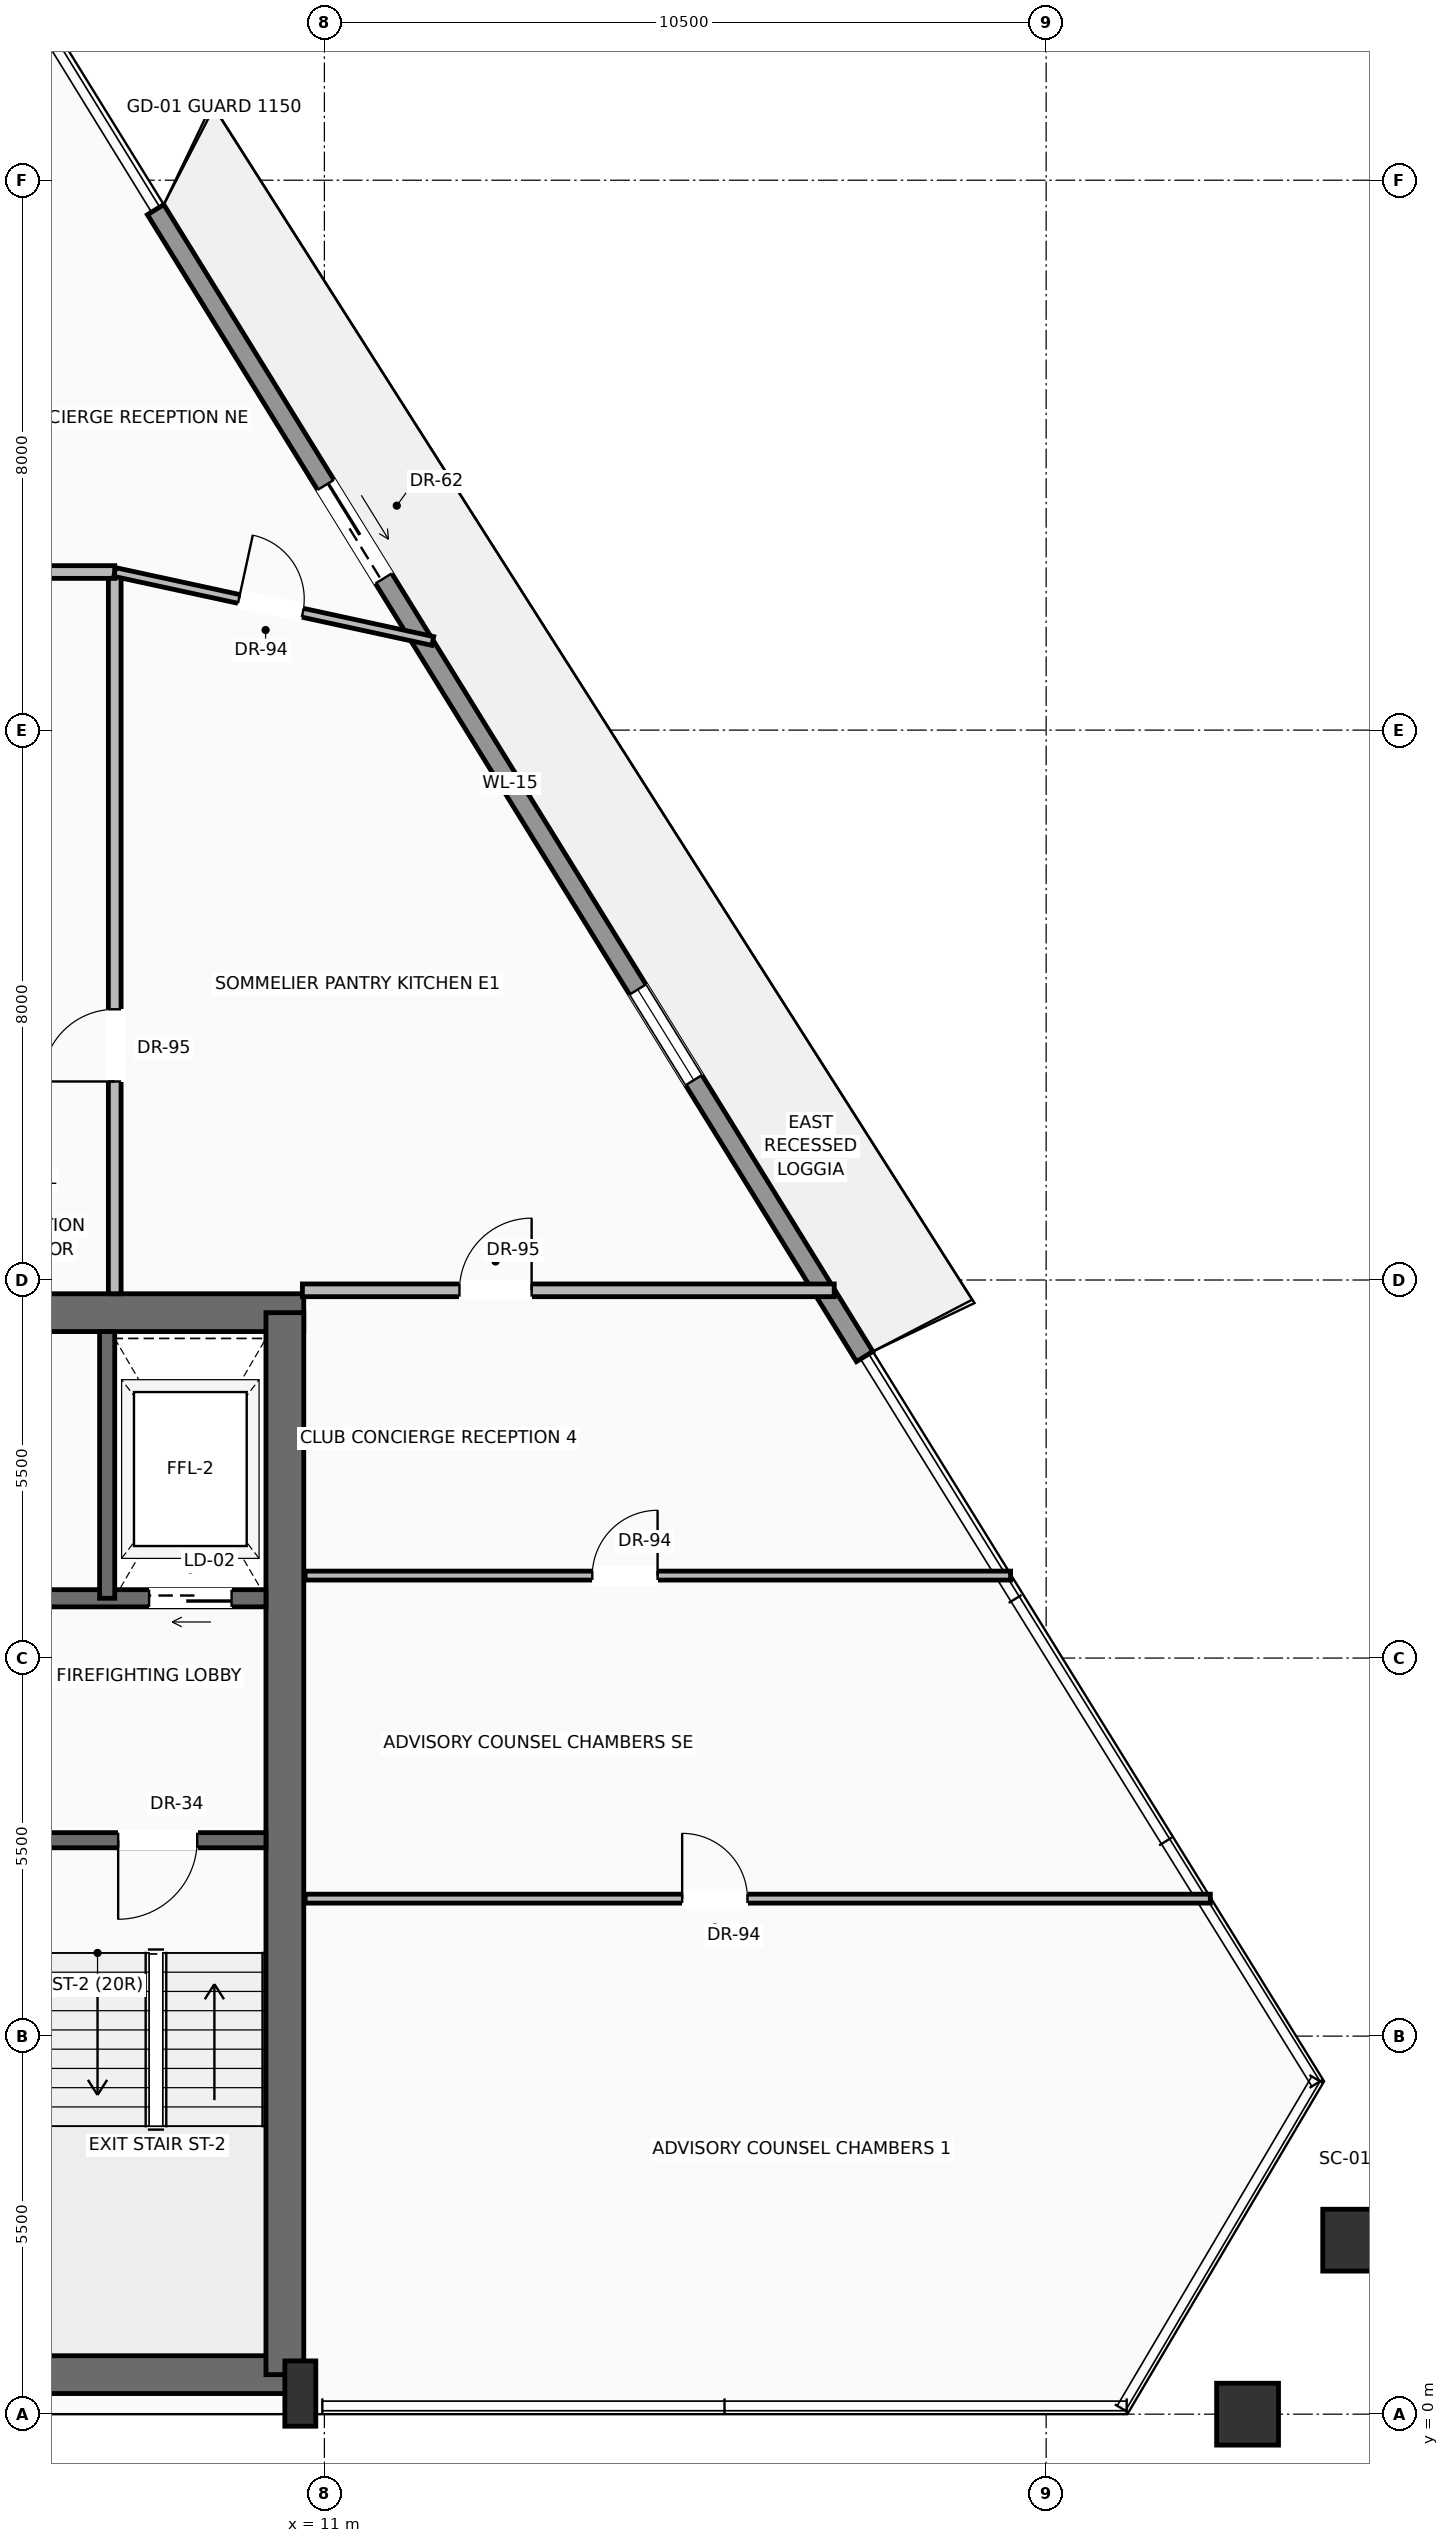
"""IFC4 building model, lengths in metres.
Left out: names, types, materials, properties, quantities, classifications, styles, units other than length and angle.
Written with IfcOpenShell. Run it as: python <this file> out.ifc"""

import sys

from ifc_helpers import new_model, si_unit, direction, frame, frame_2d, origin, origin_2d, place, context, subcontext, project, spatial, rectangle, hollow_rectangle, extrude, source, transform, mapped, element, fill, save


model = new_model("IFC4")
c1 = context("Model", 3, precision=1e-05, world=origin(), true_north=direction((0.0, 1.0)))
c2 = subcontext(c1, "Body", "Model", "MODEL_VIEW")
j1 = project(units=[si_unit("LENGTHUNIT", "METRE"), si_unit("PLANEANGLEUNIT", "RADIAN")], contexts=[c1])
p1 = place(None, origin())
s1 = spatial("IfcSite", under=j1, at=p1, CompositionType="ELEMENT")
p2 = place(p1, origin())
s2 = spatial("IfcBuilding", under=s1, at=p2, CompositionType="ELEMENT")
p3 = place(p2, frame((0.0, 0.0, 237.25)))
s3 = spatial("IfcBuildingStorey", under=s2, at=p3, CompositionType="ELEMENT", Elevation=237.25)
p4 = place(p3, frame((-10.65, 0.575, 0.0), z_axis=(0.0, 0.0, 1.0), x_axis=(1.0, 0.0, 0.0)))
e1 = element("IfcWall", 1, at=p4, inside=s3, PredefinedType="SHEAR", context=c2, shape_type="SweptSolid", body=[
    extrude(rectangle(XDim=21.3, YDim=0.55, at=frame_2d((10.65, 0.0))), origin(), (0.0, 0.0, 1.0), 3.24),
])
p5 = place(p3, frame((-10.7, 16.025, 0.0), z_axis=(0.0, 0.0, 1.0), x_axis=(1.0, 0.0, 0.0)))
e2 = element("IfcWall", 2, at=p5, inside=s3, PredefinedType="SHEAR", context=c2, shape_type="SweptSolid", body=[
    extrude(rectangle(XDim=21.4, YDim=0.55, at=frame_2d((10.7, 0.0))), origin(), (0.0, 0.0, 1.0), 3.24),
])
p6 = place(p5, frame((3.27, 0.0, 0.0)))
e3 = element("IfcOpeningElement", 3, at=p6, cuts=e2, PredefinedType="OPENING", context=c2, shape_type="SweptSolid", body=[
    extrude(rectangle(XDim=1.3, YDim=2.3, at=frame_2d((0.65, 1.15))), frame((0.0, 0.285, 0.0), z_axis=(0.0, -1.0, 0.0), x_axis=(1.0, 0.0, 0.0)), (0.0, 0.0, 1.0), 0.57),
])
p7 = place(p5, frame((9.7, 0.0, 0.0)))
e4 = element("IfcOpeningElement", 4, at=p7, cuts=e2, PredefinedType="OPENING", context=c2, shape_type="SweptSolid", body=[
    extrude(rectangle(XDim=2.0, YDim=2.4, at=frame_2d((1.0, 1.2))), frame((0.0, 0.285, 0.0), z_axis=(0.0, -1.0, 0.0), x_axis=(1.0, 0.0, 0.0)), (0.0, 0.0, 1.0), 0.57),
])
p8 = place(p3, frame((10.425, 0.575, 0.0), z_axis=(0.0, 0.0, 1.0), x_axis=(0.0, 1.0, 0.0)))
e5 = element("IfcWall", 5, at=p8, inside=s3, PredefinedType="SHEAR", context=c2, shape_type="SweptSolid", body=[
    extrude(rectangle(XDim=15.45, YDim=0.55, at=frame_2d((7.725, 0.0))), origin(), (0.0, 0.0, 1.0), 3.24),
])
m1 = source(origin(), c2, "Body", "SweptSolid", [
    extrude(rectangle(XDim=0.45, YDim=0.95, at=origin_2d()), origin(), (0.0, 0.0, 1.0), 3.45),
])
p9 = place(p3, frame((10.65, 0.3, 0.0), z_axis=(0.0, 0.0, 1.0), x_axis=(1.0, 0.0, 0.0)))
e6 = element("IfcColumn", 6, at=p9, inside=s3, PredefinedType="PILASTER", context=c2, shape_type="MappedRepresentation", body=[
    mapped(m1, transform((0.0, 0.0, 0.0), scale=1.0)),
])
m2 = source(origin(), c2, "Body", "SweptSolid", [
    extrude(hollow_rectangle(XDim=0.9, YDim=0.9, WallThickness=0.045, at=origin_2d()), origin(), (0.0, 0.0, 1.0), 3.441),
])
p10 = place(p3, frame((24.43, 0.0, 0.004), z_axis=(0.001277047557, 0.0, 0.999999184574), x_axis=(1.0, 0.0, 0.0)))
e7 = element("IfcColumn", 7, at=p10, inside=s3, PredefinedType="COLUMN", context=c2, shape_type="MappedRepresentation", body=[
    mapped(m2, transform((0.0, 0.0, 0.0), scale=1.0)),
])
m3 = source(origin(), c2, "Body", "SweptSolid", [
    extrude(hollow_rectangle(XDim=0.9, YDim=0.9, WallThickness=0.045, at=origin_2d()), origin(), (0.0, 0.0, 1.0), 3.442),
])
p11 = place(p3, frame((25.974, 2.531, 0.004), z_axis=(-0.009717994802, -0.016385816053, 0.999818516336), x_axis=(0.860110033295, -0.510108547885, 0.0)))
e8 = element("IfcColumn", 8, at=p11, inside=s3, PredefinedType="COLUMN", context=c2, shape_type="MappedRepresentation", body=[
    mapped(m3, transform((0.0, 0.0, 0.0), scale=1.0)),
])
p12 = place(p3, frame((8.545, 32.072, 0.0), z_axis=(0.0, 0.0, 1.0), x_axis=(0.52585107611, -0.850576654837, 0.0)))
e9 = element("IfcWall", 9, at=p12, inside=s3, PredefinedType="SOLIDWALL", context=c2, shape_type="SweptSolid", body=[
    extrude(rectangle(XDim=19.616, YDim=0.28, at=frame_2d((9.808, 0.0))), origin(), (0.0, 0.0, 1.0), 2.82),
])
p13 = place(p12, frame((4.708, 0.0, 0.0)))
e10 = element("IfcOpeningElement", 10, at=p13, cuts=e9, PredefinedType="OPENING", context=c2, shape_type="SweptSolid", body=[
    extrude(rectangle(XDim=1.6, YDim=2.35, at=frame_2d((0.8, 1.175))), frame((0.0, 0.15, 0.0), z_axis=(0.0, -1.0, 0.0), x_axis=(1.0, 0.0, 0.0)), (0.0, 0.0, 1.0), 0.3),
])
p14 = place(p12, frame((13.339, 0.0, 0.9)))
e11 = element("IfcOpeningElement", 11, at=p14, cuts=e9, PredefinedType="OPENING", context=c2, shape_type="SweptSolid", body=[
    extrude(rectangle(XDim=1.55, YDim=1.75, at=frame_2d((0.775, 0.875))), frame((0.0, 0.15, 0.0), z_axis=(0.0, -1.0, 0.0), x_axis=(1.0, 0.0, 0.0)), (0.0, 0.0, 1.0), 0.3),
])
p15 = place(p3, frame((10.15, 8.35, 0.0), z_axis=(0.0, 0.0, 1.0), x_axis=(-1.0, 0.0, 0.0)))
e12 = element("IfcWall", 12, at=p15, inside=s3, PredefinedType="SOLIDWALL", context=c2, shape_type="SweptSolid", body=[
    extrude(rectangle(XDim=4.65, YDim=0.22, at=frame_2d((2.325, 0.0))), origin(), (0.0, 0.0, 1.0), 3.24),
])
p16 = place(p15, frame((1.0, 0.0, 0.0)))
e13 = element("IfcOpeningElement", 13, at=p16, cuts=e12, PredefinedType="OPENING", context=c2, shape_type="SweptSolid", body=[
    extrude(rectangle(XDim=1.15, YDim=2.2, at=frame_2d((0.575, 1.1))), frame((0.0, 0.12, 0.0), z_axis=(0.0, -1.0, 0.0), x_axis=(1.0, 0.0, 0.0)), (0.0, 0.0, 1.0), 0.24),
])
p17 = place(p3, frame((10.15, 11.87, 0.0), z_axis=(0.0, 0.0, 1.0), x_axis=(-1.0, 0.0, 0.0)))
e14 = element("IfcWall", 14, at=p17, inside=s3, PredefinedType="SOLIDWALL", context=c2, shape_type="SweptSolid", body=[
    extrude(rectangle(XDim=4.65, YDim=0.25, at=frame_2d((2.325, 0.0))), origin(), (0.0, 0.0, 1.0), 3.24),
])
p18 = place(p17, frame((0.5, 0.0, 0.0)))
e15 = element("IfcOpeningElement", 15, at=p18, cuts=e14, PredefinedType="OPENING", context=c2, shape_type="SweptSolid", body=[
    extrude(rectangle(XDim=1.2, YDim=2.25, at=frame_2d((0.6, 1.125))), frame((0.0, 0.135, 0.0), z_axis=(0.0, -1.0, 0.0), x_axis=(1.0, 0.0, 0.0)), (0.0, 0.0, 1.0), 0.27),
])
p19 = place(p3, frame((7.84, 11.87, 0.0), z_axis=(0.0, 0.0, 1.0), x_axis=(0.0, 1.0, 0.0)))
e16 = element("IfcWall", 16, at=p19, inside=s3, PredefinedType="SOLIDWALL", context=c2, shape_type="SweptSolid", body=[
    extrude(rectangle(XDim=3.88, YDim=0.22, at=frame_2d((1.94, 0.0))), origin(), (0.0, 0.0, 1.0), 3.24),
])
p20 = place(p3, frame((7.95, 16.3, 0.0), z_axis=(0.0, 0.0, 1.0), x_axis=(0.0, 1.0, 0.0)))
e17 = element("IfcWall", 17, at=p20, inside=s3, PredefinedType="PARTITIONING", context=c2, shape_type="SweptSolid", body=[
    extrude(rectangle(XDim=10.5, YDim=0.185, at=frame_2d((5.25, 0.0))), origin(), (0.0, 0.0, 1.0), 3.232),
])
p21 = place(p20, frame((3.088, 0.0, 0.0)))
e18 = element("IfcOpeningElement", 18, at=p21, cuts=e17, PredefinedType="OPENING", context=c2, shape_type="SweptSolid", body=[
    extrude(rectangle(XDim=1.05, YDim=2.25, at=frame_2d((0.525, 1.125))), frame((0.0, 0.103, 0.0), z_axis=(0.0, -1.0, 0.0), x_axis=(1.0, 0.0, 0.0)), (0.0, 0.0, 1.0), 0.205),
])
p22 = place(p3, frame((-8.65, 26.8, 0.0), z_axis=(0.0, 0.0, 1.0), x_axis=(1.0, 0.0, 0.0)))
e19 = element("IfcWall", 19, at=p22, inside=s3, PredefinedType="PARTITIONING", context=c2, shape_type="SweptSolid", body=[
    extrude(rectangle(XDim=16.6, YDim=0.185, at=frame_2d((8.3, 0.0))), origin(), (0.0, 0.0, 1.0), 3.232),
])
p23 = place(p22, frame((3.847, 0.0, 0.0)))
e20 = element("IfcOpeningElement", 20, at=p23, cuts=e19, PredefinedType="OPENING", context=c2, shape_type="SweptSolid", body=[
    extrude(rectangle(XDim=1.05, YDim=2.25, at=frame_2d((0.525, 1.125))), frame((0.0, 0.103, 0.0), z_axis=(0.0, -1.0, 0.0), x_axis=(1.0, 0.0, 0.0)), (0.0, 0.0, 1.0), 0.205),
])
p24 = place(p22, frame((6.903, 0.0, 0.0)))
e21 = element("IfcOpeningElement", 21, at=p24, cuts=e19, PredefinedType="OPENING", context=c2, shape_type="SweptSolid", body=[
    extrude(rectangle(XDim=1.05, YDim=2.25, at=frame_2d((0.525, 1.125))), frame((0.0, 0.103, 0.0), z_axis=(0.0, -1.0, 0.0), x_axis=(1.0, 0.0, 0.0)), (0.0, 0.0, 1.0), 0.205),
])
p25 = place(p22, frame((12.403, 0.0, 0.0)))
e22 = element("IfcOpeningElement", 22, at=p25, cuts=e19, PredefinedType="OPENING", context=c2, shape_type="SweptSolid", body=[
    extrude(rectangle(XDim=1.05, YDim=2.25, at=frame_2d((0.525, 1.125))), frame((0.0, 0.103, 0.0), z_axis=(0.0, -1.0, 0.0), x_axis=(1.0, 0.0, 0.0)), (0.0, 0.0, 1.0), 0.205),
])
p26 = place(p22, frame((1.403, 0.0, 0.0)))
e23 = element("IfcOpeningElement", 23, at=p26, cuts=e19, PredefinedType="OPENING", context=c2, shape_type="SweptSolid", body=[
    extrude(rectangle(XDim=1.05, YDim=2.25, at=frame_2d((0.525, 1.125))), frame((0.0, 0.103, 0.0), z_axis=(0.0, -1.0, 0.0), x_axis=(1.0, 0.0, 0.0)), (0.0, 0.0, 1.0), 0.205),
])
p27 = place(p3, frame((10.68, 16.35, 0.0), z_axis=(0.0, 0.0, 1.0), x_axis=(1.0, 0.0, 0.0)))
e24 = element("IfcWall", 24, at=p27, inside=s3, PredefinedType="PARTITIONING", context=c2, shape_type="SweptSolid", body=[
    extrude(rectangle(XDim=7.737, YDim=0.185, at=frame_2d((3.869, 0.0))), origin(), (0.0, 0.0, 1.0), 3.232),
])
p28 = place(p27, frame((2.285, 0.0, 0.0)))
e25 = element("IfcOpeningElement", 25, at=p28, cuts=e24, PredefinedType="OPENING", context=c2, shape_type="SweptSolid", body=[
    extrude(rectangle(XDim=1.05, YDim=2.25, at=frame_2d((0.525, 1.125))), frame((0.0, 0.103, 0.0), z_axis=(0.0, -1.0, 0.0), x_axis=(1.0, 0.0, 0.0)), (0.0, 0.0, 1.0), 0.205),
])
p29 = place(p3, frame((7.95, 26.8, 0.0), z_axis=(0.0, 0.0, 1.0), x_axis=(0.977283281689, -0.211937224976, 0.0)))
e26 = element("IfcWall", 26, at=p29, inside=s3, PredefinedType="PARTITIONING", context=c2, shape_type="SweptSolid", body=[
    extrude(rectangle(XDim=4.735, YDim=0.13, at=frame_2d((2.367, 0.0))), origin(), (0.0, 0.0, 1.0), 3.232),
])
p30 = place(p29, frame((1.849, 0.0, 0.0)))
e27 = element("IfcOpeningElement", 27, at=p30, cuts=e26, PredefinedType="OPENING", context=c2, shape_type="SweptSolid", body=[
    extrude(rectangle(XDim=0.95, YDim=2.2, at=frame_2d((0.475, 1.1))), frame((0.0, 0.075, 0.0), z_axis=(0.0, -1.0, 0.0), x_axis=(1.0, 0.0, 0.0)), (0.0, 0.0, 1.0), 0.15),
])
p31 = place(p3, frame((10.72, 7.5, 0.0), z_axis=(0.0, 0.0, 1.0), x_axis=(1.0, 0.0, 0.0)))
e28 = element("IfcWall", 28, at=p31, inside=s3, PredefinedType="PARTITIONING", context=c2, shape_type="SweptSolid", body=[
    extrude(rectangle(XDim=13.168, YDim=0.13, at=frame_2d((6.584, 0.0))), origin(), (0.0, 0.0, 1.0), 3.232),
])
p32 = place(p31, frame((5.485, 0.0, 0.0)))
e29 = element("IfcOpeningElement", 29, at=p32, cuts=e28, PredefinedType="OPENING", context=c2, shape_type="SweptSolid", body=[
    extrude(rectangle(XDim=0.95, YDim=2.2, at=frame_2d((0.475, 1.1))), frame((0.0, 0.075, 0.0), z_axis=(0.0, -1.0, 0.0), x_axis=(1.0, 0.0, 0.0)), (0.0, 0.0, 1.0), 0.15),
])
p33 = place(p3, frame((10.72, 12.2, 0.0), z_axis=(0.0, 0.0, 1.0), x_axis=(1.0, 0.0, 0.0)))
e30 = element("IfcWall", 30, at=p33, inside=s3, PredefinedType="PARTITIONING", context=c2, shape_type="SweptSolid", body=[
    extrude(rectangle(XDim=10.263, YDim=0.13, at=frame_2d((5.131, 0.0))), origin(), (0.0, 0.0, 1.0), 3.232),
])
p34 = place(p33, frame((4.177, 0.0, 0.0)))
e31 = element("IfcOpeningElement", 31, at=p34, cuts=e30, PredefinedType="OPENING", context=c2, shape_type="SweptSolid", body=[
    extrude(rectangle(XDim=0.95, YDim=2.2, at=frame_2d((0.475, 1.1))), frame((0.0, 0.075, 0.0), z_axis=(0.0, -1.0, 0.0), x_axis=(1.0, 0.0, 0.0)), (0.0, 0.0, 1.0), 0.15),
])
m4 = source(origin(), c2, "Body", "SweptSolid", [
    extrude(rectangle(XDim=1.6, YDim=2.35, at=frame_2d((0.8, 1.175))), frame((0.0, 0.025, 0.0), z_axis=(0.0, -1.0, 0.0), x_axis=(1.0, 0.0, 0.0)), (0.0, 0.0, 1.0), 0.05),
])
p35 = place(p13, origin())
e32 = element("IfcDoor", 32, at=p35, inside=s3, OperationType="SLIDING_TO_RIGHT", PredefinedType="DOOR", context=c2, shape_type="MappedRepresentation", body=[
    mapped(m4, transform((0.0, 0.0, 0.0), scale=1.0)),
])
fill(e10, e32)
m5 = source(origin(), c2, "Body", "SweptSolid", [
    extrude(rectangle(XDim=1.55, YDim=1.75, at=frame_2d((0.775, 0.875))), frame((0.0, 0.03, 0.0), z_axis=(0.0, -1.0, 0.0), x_axis=(1.0, 0.0, 0.0)), (0.0, 0.0, 1.0), 0.06),
])
p36 = place(p14, origin())
e33 = element("IfcWindow", 33, at=p36, inside=s3, PartitioningType="SINGLE_PANEL", PredefinedType="WINDOW", context=c2, shape_type="MappedRepresentation", body=[
    mapped(m5, transform((0.0, 0.0, 0.0), scale=1.0)),
])
fill(e11, e33)
m6 = source(origin(), c2, "Body", "SweptSolid", [
    extrude(rectangle(XDim=1.15, YDim=2.2, at=frame_2d((0.575, 1.1))), frame((0.0, 0.025, 0.0), z_axis=(0.0, -1.0, 0.0), x_axis=(1.0, 0.0, 0.0)), (0.0, 0.0, 1.0), 0.05),
])
p37 = place(p16, origin())
e34 = element("IfcDoor", 34, at=p37, inside=s3, OperationType="SINGLE_SWING_RIGHT", PredefinedType="DOOR", context=c2, shape_type="MappedRepresentation", body=[
    mapped(m6, transform((0.0, 0.0, 0.0), scale=1.0)),
])
fill(e13, e34)
m7 = source(origin(), c2, "Body", "SweptSolid", [
    extrude(rectangle(XDim=1.2, YDim=2.25, at=frame_2d((0.6, 1.125))), frame((0.0, 0.025, 0.0), z_axis=(0.0, -1.0, 0.0), x_axis=(1.0, 0.0, 0.0)), (0.0, 0.0, 1.0), 0.05),
])
p38 = place(p18, origin())
e35 = element("IfcDoor", 35, at=p38, inside=s3, OperationType="SLIDING_TO_RIGHT", PredefinedType="DOOR", context=c2, shape_type="MappedRepresentation", body=[
    mapped(m7, transform((0.0, 0.0, 0.0), scale=1.0)),
])
fill(e15, e35)
m8 = source(origin(), c2, "Body", "SweptSolid", [
    extrude(rectangle(XDim=1.05, YDim=2.25, at=frame_2d((0.525, 1.125))), frame((0.0, 0.025, 0.0), z_axis=(0.0, -1.0, 0.0), x_axis=(1.0, 0.0, 0.0)), (0.0, 0.0, 1.0), 0.05),
])
p39 = place(p28, origin())
e36 = element("IfcDoor", 36, at=p39, inside=s3, OperationType="SINGLE_SWING_RIGHT", PredefinedType="DOOR", context=c2, shape_type="MappedRepresentation", body=[
    mapped(m8, transform((0.0, 0.0, 0.0), scale=1.0)),
])
fill(e25, e36)
m9 = source(origin(), c2, "Body", "SweptSolid", [
    extrude(rectangle(XDim=0.95, YDim=2.2, at=frame_2d((0.475, 1.1))), frame((0.0, 0.025, 0.0), z_axis=(0.0, -1.0, 0.0), x_axis=(1.0, 0.0, 0.0)), (0.0, 0.0, 1.0), 0.05),
])
p40 = place(p32, origin())
e37 = element("IfcDoor", 37, at=p40, inside=s3, OperationType="SINGLE_SWING_LEFT", PredefinedType="DOOR", context=c2, shape_type="MappedRepresentation", body=[
    mapped(m9, transform((0.0, 0.0, 0.0), scale=1.0)),
])
fill(e29, e37)
p41 = place(p34, origin())
e38 = element("IfcDoor", 38, at=p41, inside=s3, OperationType="SINGLE_SWING_RIGHT", PredefinedType="DOOR", context=c2, shape_type="MappedRepresentation", body=[
    mapped(m9, transform((0.0, 0.0, 0.0), scale=1.0)),
])
fill(e31, e38)
p42 = place(p21, origin())
e39 = element("IfcDoor", 39, at=p42, inside=s3, OperationType="SINGLE_SWING_LEFT", PredefinedType="DOOR", context=c2, shape_type="MappedRepresentation", body=[
    mapped(m8, transform((0.0, 0.0, 0.0), scale=1.0)),
])
fill(e18, e39)
p43 = place(p30, origin())
e40 = element("IfcDoor", 40, at=p43, inside=s3, OperationType="SINGLE_SWING_LEFT", PredefinedType="DOOR", context=c2, shape_type="MappedRepresentation", body=[
    mapped(m9, transform((0.0, 0.0, 0.0), scale=1.0)),
])
fill(e27, e40)
save(model, sys.argv[1])
